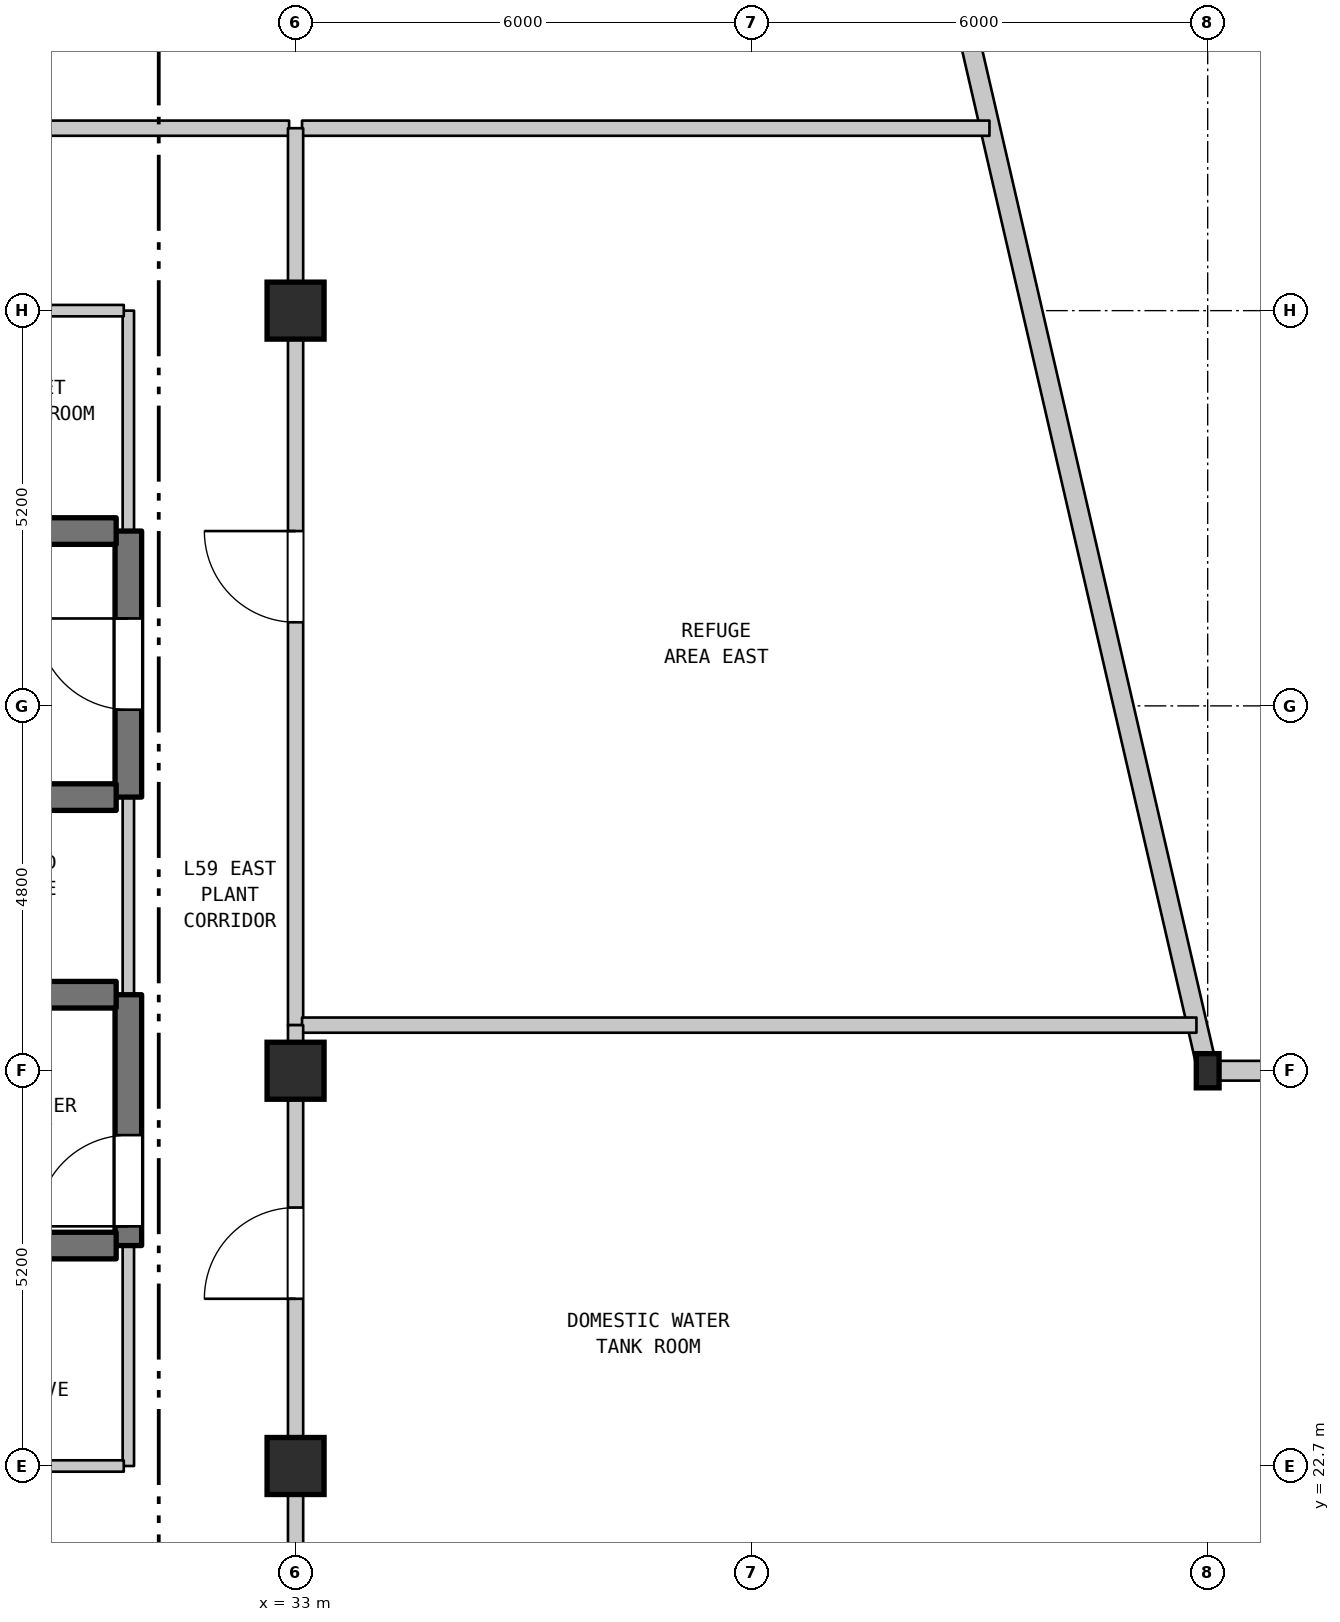
"""IFC4 building model, lengths in metres.
Left out: names, types, materials, properties, quantities, classifications, styles, units other than length and angle.
Written with IfcOpenShell. Run it as: python <this file> out.ifc"""

import sys

from ifc_helpers import new_model, si_unit, direction, frame, frame_2d, origin, origin_2d, place, context, subcontext, project, spatial, rectangle, i_section, extrude, element, fill, save


model = new_model("IFC4")
c1 = context("Model", 3, precision=1e-05, world=origin(), true_north=direction((0.0, 1.0)))
c2 = subcontext(c1, "Body", "Model", "MODEL_VIEW")
j1 = project(units=[si_unit("LENGTHUNIT", "METRE"), si_unit("PLANEANGLEUNIT", "RADIAN")], contexts=[c1])
p1 = place(None, origin())
s1 = spatial("IfcSite", under=j1, at=p1, CompositionType="ELEMENT")
p2 = place(p1, origin())
s2 = spatial("IfcBuilding", under=s1, at=p2, CompositionType="ELEMENT")
p3 = place(p2, frame((0.0, 0.0, 237.6)))
s3 = spatial("IfcBuildingStorey", under=s2, at=p3, CompositionType="ELEMENT", Elevation=237.6)
for number, where, z_axis, x_axis in (
    (1, (33.0, 22.7, 0.0), (0.0, 0.0, 1.0), (1.0, 0.0, 0.0)),
    (2, (33.0, 27.9, 0.0), (0.0, 0.0, 1.0), (1.0, 0.0, 0.0)),
    (3, (33.0, 37.9, 0.0), (0.0, 0.0, 1.0), (1.0, 0.0, 0.0)),
):
    element("IfcColumn", number, at=place(p3, frame(where, z_axis=z_axis, x_axis=x_axis)), inside=s3, PredefinedType="COLUMN", context=c2, shape_type="SweptSolid", body=[
        extrude(rectangle(XDim=0.75, YDim=0.75, at=origin_2d()), origin(), (0.0, 0.0, 1.0), 5.2),
    ])
p4 = place(p3, frame((45.0, 27.9, 0.0), z_axis=(0.0, 0.0, 1.0), x_axis=(1.0, 0.0, 0.0)))
e4 = element("IfcColumn", 4, at=p4, inside=s3, PredefinedType="COLUMN", context=c2, shape_type="SweptSolid", body=[
    extrude(i_section(OverallWidth=0.3, OverallDepth=0.45, WebThickness=0.014, FlangeThickness=0.026, FilletRadius=0.027, at=origin_2d()), origin(), (0.0, 0.0, 1.0), 5.2),
])
p5 = place(p3, frame((39.358, 52.35, 0.0), z_axis=(0.0, 0.0, 1.0), x_axis=(0.224849558511, -0.974393491377, 0.0)))
e5 = element("IfcWall", 5, at=p5, inside=s3, PredefinedType="STANDARD", context=c2, shape_type="SweptSolid", body=[
    extrude(rectangle(XDim=25.093, YDim=0.26, at=frame_2d((12.546, 0.0))), origin(), (0.0, 0.0, 1.0), 4.88),
])
p6 = place(p3, frame((45.0, 27.9, 0.0), z_axis=(0.0, 0.0, 1.0), x_axis=(1.0, 0.0, 0.0)))
e6 = element("IfcWall", 6, at=p6, inside=s3, PredefinedType="STANDARD", context=c2, shape_type="SweptSolid", body=[
    extrude(rectangle(XDim=10.0, YDim=0.26, at=frame_2d((5.0, 0.0))), origin(), (0.0, 0.0, 1.0), 4.88),
])
p7 = place(p3, frame((30.8, 22.7, 0.0), z_axis=(0.0, 0.0, 1.0), x_axis=(0.0, 1.0, 0.0)))
e7 = element("IfcWall", 7, at=p7, inside=s3, PredefinedType="STANDARD", context=c2, shape_type="SweptSolid", body=[
    extrude(rectangle(XDim=2.9, YDim=0.15, at=frame_2d((1.45, 0.0))), origin(), (0.0, 0.0, 1.0), 4.88),
])
p8 = place(p3, frame((30.8, 25.6, 0.0), z_axis=(0.0, 0.0, 1.0), x_axis=(0.0, 1.0, 0.0)))
e8 = element("IfcWall", 8, at=p8, inside=s3, PredefinedType="SHEAR", context=c2, shape_type="SweptSolid", body=[
    extrude(rectangle(XDim=3.3, YDim=0.35, at=frame_2d((1.65, 0.0))), origin(), (0.0, 0.0, 1.0), 4.88),
])
p9 = place(p8, frame((0.253, 0.0, 0.0)))
e9 = element("IfcOpeningElement", 9, at=p9, cuts=e8, PredefinedType="OPENING", context=c2, shape_type="SweptSolid", body=[
    extrude(rectangle(XDim=1.2, YDim=2.2, at=frame_2d((0.6, 1.1))), frame((0.0, 0.185, 0.0), z_axis=(0.0, -1.0, 0.0), x_axis=(1.0, 0.0, 0.0)), (0.0, 0.0, 1.0), 0.37),
])
p10 = place(p3, frame((30.8, 28.9, 0.0), z_axis=(0.0, 0.0, 1.0), x_axis=(0.0, 1.0, 0.0)))
e10 = element("IfcWall", 10, at=p10, inside=s3, PredefinedType="STANDARD", context=c2, shape_type="SweptSolid", body=[
    extrude(rectangle(XDim=2.6, YDim=0.15, at=frame_2d((1.3, 0.0))), origin(), (0.0, 0.0, 1.0), 4.88),
])
p11 = place(p3, frame((30.8, 31.5, 0.0), z_axis=(0.0, 0.0, 1.0), x_axis=(0.0, 1.0, 0.0)))
e11 = element("IfcWall", 11, at=p11, inside=s3, PredefinedType="SHEAR", context=c2, shape_type="SweptSolid", body=[
    extrude(rectangle(XDim=3.5, YDim=0.35, at=frame_2d((1.75, 0.0))), origin(), (0.0, 0.0, 1.0), 4.88),
])
p12 = place(p11, frame((1.15, 0.0, 0.0)))
e12 = element("IfcOpeningElement", 12, at=p12, cuts=e11, PredefinedType="OPENING", context=c2, shape_type="SweptSolid", body=[
    extrude(rectangle(XDim=1.2, YDim=2.2, at=frame_2d((0.6, 1.1))), frame((0.0, 0.185, 0.0), z_axis=(0.0, -1.0, 0.0), x_axis=(1.0, 0.0, 0.0)), (0.0, 0.0, 1.0), 0.37),
])
p13 = place(p3, frame((30.8, 35.0, 0.0), z_axis=(0.0, 0.0, 1.0), x_axis=(0.0, 1.0, 0.0)))
e13 = element("IfcWall", 13, at=p13, inside=s3, PredefinedType="STANDARD", context=c2, shape_type="SweptSolid", body=[
    extrude(rectangle(XDim=2.9, YDim=0.15, at=frame_2d((1.45, 0.0))), origin(), (0.0, 0.0, 1.0), 4.88),
])
p14 = place(p3, frame((33.0, 20.3, 0.0), z_axis=(0.0, 0.0, 1.0), x_axis=(0.0, 1.0, 0.0)))
e14 = element("IfcWall", 14, at=p14, inside=s3, PredefinedType="STANDARD", context=c2, shape_type="SweptSolid", body=[
    extrude(rectangle(XDim=7.6, YDim=0.2, at=frame_2d((3.8, 0.0))), origin(), (0.0, 0.0, 1.0), 4.59),
])
p15 = place(p14, frame((4.6, 0.0, 0.0)))
e15 = element("IfcOpeningElement", 15, at=p15, cuts=e14, PredefinedType="OPENING", context=c2, shape_type="SweptSolid", body=[
    extrude(rectangle(XDim=1.2, YDim=2.2, at=frame_2d((0.6, 1.1))), frame((0.0, 0.11, 0.0), z_axis=(0.0, -1.0, 0.0), x_axis=(1.0, 0.0, 0.0)), (0.0, 0.0, 1.0), 0.22),
])
p16 = place(p3, frame((33.0, 28.5, 0.0), z_axis=(0.0, 0.0, 1.0), x_axis=(0.0, 1.0, 0.0)))
e16 = element("IfcWall", 16, at=p16, inside=s3, PredefinedType="STANDARD", context=c2, shape_type="SweptSolid", body=[
    extrude(rectangle(XDim=9.4, YDim=0.2, at=frame_2d((4.7, 0.0))), origin(), (0.0, 0.0, 1.0), 4.38),
])
p17 = place(p16, frame((5.3, 0.0, 0.0)))
e17 = element("IfcOpeningElement", 17, at=p17, cuts=e16, PredefinedType="OPENING", context=c2, shape_type="SweptSolid", body=[
    extrude(rectangle(XDim=1.2, YDim=2.2, at=frame_2d((0.6, 1.1))), frame((0.0, 0.11, 0.0), z_axis=(0.0, -1.0, 0.0), x_axis=(1.0, 0.0, 0.0)), (0.0, 0.0, 1.0), 0.22),
])
p18 = place(p3, frame((27.46, 22.7, 0.0), z_axis=(0.0, 0.0, 1.0), x_axis=(1.0, 0.0, 0.0)))
e18 = element("IfcWall", 18, at=p18, inside=s3, PredefinedType="STANDARD", context=c2, shape_type="SweptSolid", body=[
    extrude(rectangle(XDim=3.28, YDim=0.15, at=frame_2d((1.64, 0.0))), origin(), (0.0, 0.0, 1.0), 4.88),
])
p19 = place(p3, frame((27.46, 25.6, 0.0), z_axis=(0.0, 0.0, 1.0), x_axis=(1.0, 0.0, 0.0)))
e19 = element("IfcWall", 19, at=p19, inside=s3, PredefinedType="SHEAR", context=c2, shape_type="SweptSolid", body=[
    extrude(rectangle(XDim=3.18, YDim=0.35, at=frame_2d((1.59, 0.0))), origin(), (0.0, 0.0, 1.0), 4.88),
])
p20 = place(p19, frame((1.115, 0.0, 0.0)))
e20 = element("IfcOpeningElement", 20, at=p20, cuts=e19, PredefinedType="OPENING", context=c2, shape_type="SweptSolid", body=[
    extrude(rectangle(XDim=0.95, YDim=2.15, at=frame_2d((0.475, 1.075))), frame((0.0, 0.185, 0.0), z_axis=(0.0, -1.0, 0.0), x_axis=(1.0, 0.0, 0.0)), (0.0, 0.0, 1.0), 0.37),
])
p21 = place(p3, frame((33.085, 28.5, 0.0), z_axis=(0.0, 0.0, 1.0), x_axis=(1.0, 0.0, 0.0)))
e21 = element("IfcWall", 21, at=p21, inside=s3, PredefinedType="STANDARD", context=c2, shape_type="SweptSolid", body=[
    extrude(rectangle(XDim=11.767, YDim=0.2, at=frame_2d((5.884, 0.0))), origin(), (0.0, 0.0, 1.0), 4.88),
])
p22 = place(p3, frame((27.46, 28.9, 0.0), z_axis=(0.0, 0.0, 1.0), x_axis=(1.0, 0.0, 0.0)))
e22 = element("IfcWall", 22, at=p22, inside=s3, PredefinedType="SHEAR", context=c2, shape_type="SweptSolid", body=[
    extrude(rectangle(XDim=3.18, YDim=0.35, at=frame_2d((1.59, 0.0))), origin(), (0.0, 0.0, 1.0), 4.88),
])
p23 = place(p22, frame((1.115, 0.0, 0.0)))
e23 = element("IfcOpeningElement", 23, at=p23, cuts=e22, PredefinedType="OPENING", context=c2, shape_type="SweptSolid", body=[
    extrude(rectangle(XDim=0.95, YDim=2.15, at=frame_2d((0.475, 1.075))), frame((0.0, 0.185, 0.0), z_axis=(0.0, -1.0, 0.0), x_axis=(1.0, 0.0, 0.0)), (0.0, 0.0, 1.0), 0.37),
])
p24 = place(p3, frame((27.46, 31.5, 0.0), z_axis=(0.0, 0.0, 1.0), x_axis=(1.0, 0.0, 0.0)))
e24 = element("IfcWall", 24, at=p24, inside=s3, PredefinedType="SHEAR", context=c2, shape_type="SweptSolid", body=[
    extrude(rectangle(XDim=3.18, YDim=0.35, at=frame_2d((1.59, 0.0))), origin(), (0.0, 0.0, 1.0), 4.88),
])
p25 = place(p3, frame((26.645, 35.0, 0.0), z_axis=(0.0, 0.0, 1.0), x_axis=(1.0, 0.0, 0.0)))
e25 = element("IfcWall", 25, at=p25, inside=s3, PredefinedType="SHEAR", context=c2, shape_type="SweptSolid", body=[
    extrude(rectangle(XDim=3.995, YDim=0.35, at=frame_2d((1.998, 0.0))), origin(), (0.0, 0.0, 1.0), 4.88),
])
p26 = place(p25, frame((1.508, 0.0, 0.0)))
e26 = element("IfcOpeningElement", 26, at=p26, cuts=e25, PredefinedType="OPENING", context=c2, shape_type="SweptSolid", body=[
    extrude(rectangle(XDim=0.95, YDim=2.15, at=frame_2d((0.475, 1.075))), frame((0.0, 0.185, 0.0), z_axis=(0.0, -1.0, 0.0), x_axis=(1.0, 0.0, 0.0)), (0.0, 0.0, 1.0), 0.37),
])
p27 = place(p3, frame((26.645, 37.9, 0.0), z_axis=(0.0, 0.0, 1.0), x_axis=(1.0, 0.0, 0.0)))
e27 = element("IfcWall", 27, at=p27, inside=s3, PredefinedType="STANDARD", context=c2, shape_type="SweptSolid", body=[
    extrude(rectangle(XDim=4.095, YDim=0.15, at=frame_2d((2.047, 0.0))), origin(), (0.0, 0.0, 1.0), 4.38),
])
p28 = place(p3, frame((12.685, 40.3, 0.0), z_axis=(0.0, 0.0, 1.0), x_axis=(1.0, 0.0, 0.0)))
e28 = element("IfcWall", 28, at=p28, inside=s3, PredefinedType="STANDARD", context=c2, shape_type="SweptSolid", body=[
    extrude(rectangle(XDim=20.23, YDim=0.2, at=frame_2d((10.115, 0.0))), origin(), (0.0, 0.0, 1.0), 4.88),
])
p29 = place(p28, frame((12.14, 0.0, 0.0)))
e29 = element("IfcOpeningElement", 29, at=p29, cuts=e28, PredefinedType="OPENING", context=c2, shape_type="SweptSolid", body=[
    extrude(rectangle(XDim=1.2, YDim=2.2, at=frame_2d((0.6, 1.1))), frame((0.0, 0.11, 0.0), z_axis=(0.0, -1.0, 0.0), x_axis=(1.0, 0.0, 0.0)), (0.0, 0.0, 1.0), 0.22),
])
p30 = place(p3, frame((33.085, 40.3, 0.0), z_axis=(0.0, 0.0, 1.0), x_axis=(1.0, 0.0, 0.0)))
e30 = element("IfcWall", 30, at=p30, inside=s3, PredefinedType="STANDARD", context=c2, shape_type="SweptSolid", body=[
    extrude(rectangle(XDim=9.044, YDim=0.2, at=frame_2d((4.522, 0.0))), origin(), (0.0, 0.0, 1.0), 4.88),
])
p31 = place(p3, frame((33.0, 27.9, 0.0), z_axis=(0.0, 0.0, 1.0), x_axis=(0.0, 1.0, 0.0)))
e31 = element("IfcWall", 31, at=p31, inside=s3, PredefinedType="STANDARD", context=c2, shape_type="SweptSolid", body=[
    extrude(rectangle(XDim=0.6, YDim=0.2, at=frame_2d((0.3, 0.0))), origin(), (0.0, 0.0, 1.0), 4.38),
])
p32 = place(p3, frame((33.0, 37.9, 0.0), z_axis=(0.0, 0.0, 1.0), x_axis=(0.0, 1.0, 0.0)))
e32 = element("IfcWall", 32, at=p32, inside=s3, PredefinedType="STANDARD", context=c2, shape_type="SweptSolid", body=[
    extrude(rectangle(XDim=2.4, YDim=0.2, at=frame_2d((1.2, 0.0))), origin(), (0.0, 0.0, 1.0), 4.28),
])
p33 = place(p9, origin())
e33 = element("IfcDoor", 33, at=p33, inside=s3, OperationType="SINGLE_SWING_LEFT", PredefinedType="DOOR", context=c2, shape_type="SweptSolid", body=[
    extrude(rectangle(XDim=1.2, YDim=2.2, at=frame_2d((0.6, 1.1))), frame((0.0, 0.025, 0.0), z_axis=(0.0, -1.0, 0.0), x_axis=(1.0, 0.0, 0.0)), (0.0, 0.0, 1.0), 0.05),
])
fill(e9, e33)
p34 = place(p12, origin())
e34 = element("IfcDoor", 34, at=p34, inside=s3, OperationType="SINGLE_SWING_RIGHT", PredefinedType="DOOR", context=c2, shape_type="SweptSolid", body=[
    extrude(rectangle(XDim=1.2, YDim=2.2, at=frame_2d((0.6, 1.1))), frame((0.0, 0.025, 0.0), z_axis=(0.0, -1.0, 0.0), x_axis=(1.0, 0.0, 0.0)), (0.0, 0.0, 1.0), 0.05),
])
fill(e12, e34)
p35 = place(p15, origin())
e35 = element("IfcDoor", 35, at=p35, inside=s3, OperationType="SINGLE_SWING_LEFT", PredefinedType="DOOR", context=c2, shape_type="SweptSolid", body=[
    extrude(rectangle(XDim=1.2, YDim=2.2, at=frame_2d((0.6, 1.1))), frame((0.0, 0.025, 0.0), z_axis=(0.0, -1.0, 0.0), x_axis=(1.0, 0.0, 0.0)), (0.0, 0.0, 1.0), 0.05),
])
fill(e15, e35)
p36 = place(p17, origin())
e36 = element("IfcDoor", 36, at=p36, inside=s3, OperationType="SINGLE_SWING_RIGHT", PredefinedType="DOOR", context=c2, shape_type="SweptSolid", body=[
    extrude(rectangle(XDim=1.2, YDim=2.2, at=frame_2d((0.6, 1.1))), frame((0.0, 0.025, 0.0), z_axis=(0.0, -1.0, 0.0), x_axis=(1.0, 0.0, 0.0)), (0.0, 0.0, 1.0), 0.05),
])
fill(e17, e36)
save(model, sys.argv[1])
